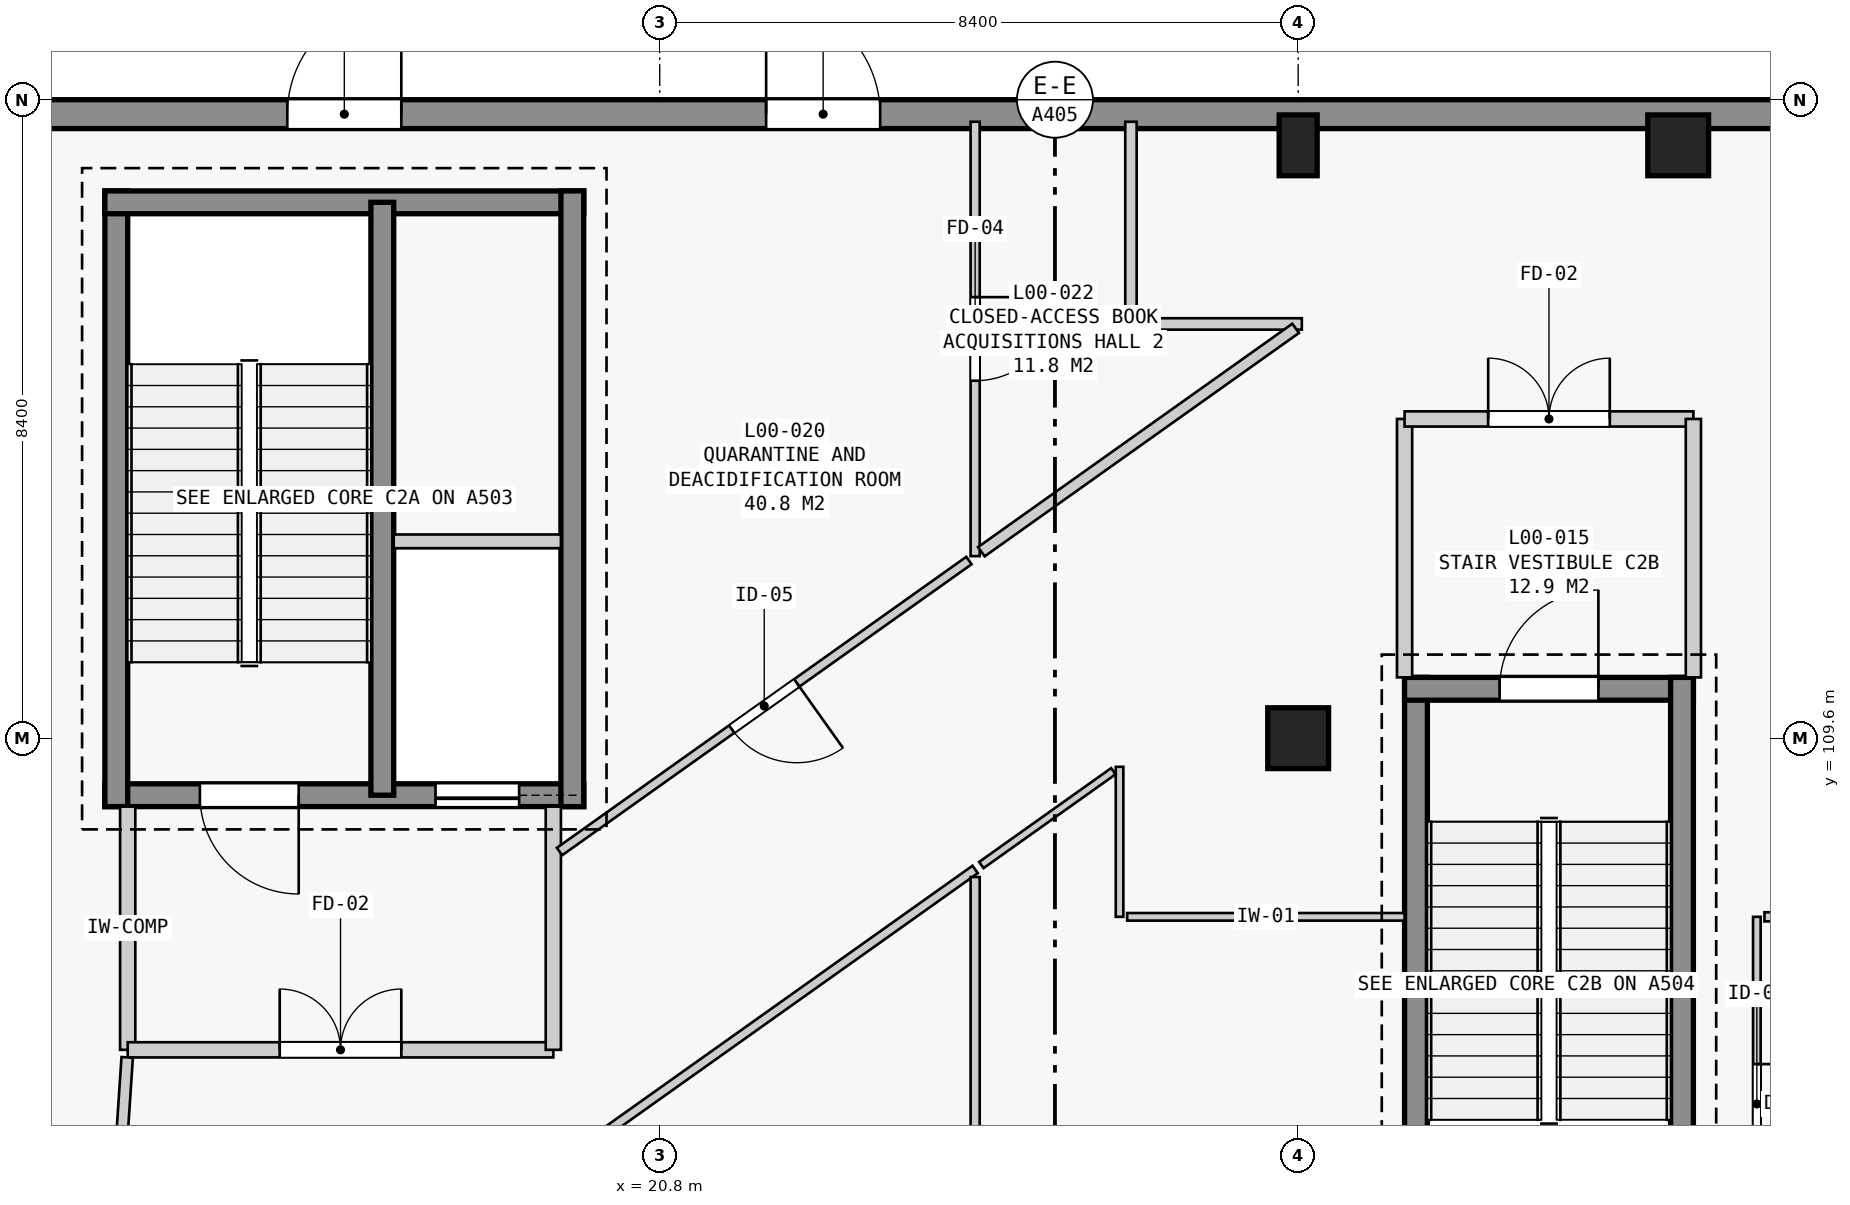
"""IFC4 building model, lengths in metres.
Left out: names, types, materials, properties, quantities, classifications, styles, units other than length and angle.
Written with IfcOpenShell. Run it as: python <this file> out.ifc"""

import sys

from ifc_helpers import new_model, si_unit, direction, frame, frame_2d, origin, origin_2d, place, context, subcontext, project, spatial, rectangle, extrude, element, fill, save


model = new_model("IFC4")
c1 = context("Model", 3, precision=1e-05, world=origin(), true_north=direction((0.0, 1.0)))
c2 = subcontext(c1, "Body", "Model", "MODEL_VIEW")
j1 = project(units=[si_unit("LENGTHUNIT", "METRE"), si_unit("PLANEANGLEUNIT", "RADIAN")], contexts=[c1])
p1 = place(None, origin())
s1 = spatial("IfcSite", under=j1, at=p1, CompositionType="ELEMENT")
p2 = place(p1, origin())
s2 = spatial("IfcBuilding", under=s1, at=p2, CompositionType="ELEMENT")
p3 = place(p2, origin())
s3 = spatial("IfcBuildingStorey", under=s2, at=p3, CompositionType="ELEMENT", Elevation=0.0)
p4 = place(p3, frame((29.2, 109.6, 0.0), z_axis=(0.0, 0.0, 1.0), x_axis=(1.0, 0.0, 0.0)))
e1 = element("IfcColumn", 1, at=p4, inside=s3, PredefinedType="COLUMN", context=c2, shape_type="SweptSolid", body=[
    extrude(rectangle(XDim=0.8, YDim=0.8, at=origin_2d()), origin(), (0.0, 0.0, 1.0), 5.4),
])
p5 = place(p3, frame((29.2, 117.4, 0.0), z_axis=(0.0, 0.0, 1.0), x_axis=(1.0, 0.0, 0.0)))
e2 = element("IfcColumn", 2, at=p5, inside=s3, PredefinedType="COLUMN", context=c2, shape_type="SweptSolid", body=[
    extrude(rectangle(XDim=0.5, YDim=0.8, at=origin_2d()), origin(), (0.0, 0.0, 1.0), 5.4),
])
p6 = place(p3, frame((34.2, 117.4, 0.0), z_axis=(0.0, 0.0, 1.0), x_axis=(1.0, 0.0, 0.0)))
e3 = element("IfcColumn", 3, at=p6, inside=s3, PredefinedType="COLUMN", context=c2, shape_type="SweptSolid", body=[
    extrude(rectangle(XDim=0.8, YDim=0.8, at=origin_2d()), origin(), (0.0, 0.0, 1.0), 5.4),
])
p7 = place(p3, frame((4.19, 117.81, 0.0), z_axis=(0.0, 0.0, 1.0), x_axis=(1.0, 0.0, 0.0)))
e4 = element("IfcWall", 4, at=p7, inside=s3, PredefinedType="STANDARD", context=c2, shape_type="SweptSolid", body=[
    extrude(rectangle(XDim=41.52, YDim=0.38, at=frame_2d((20.76, 0.0))), origin(), (0.0, 0.0, 1.0), 5.08),
])
p8 = place(p7, frame((34.36, 0.0, 0.0)))
e5 = element("IfcOpeningElement", 5, at=p8, cuts=e4, PredefinedType="OPENING", context=c2, shape_type="SweptSolid", body=[
    extrude(rectangle(XDim=1.5, YDim=2.3, at=frame_2d((0.75, 1.15))), frame((0.0, 0.2, 0.0), z_axis=(0.0, -1.0, 0.0), x_axis=(1.0, 0.0, 0.0)), (0.0, 0.0, 1.0), 0.4),
])
p9 = place(p7, frame((18.01, 0.0, 0.0)))
e6 = element("IfcOpeningElement", 6, at=p9, cuts=e4, PredefinedType="OPENING", context=c2, shape_type="SweptSolid", body=[
    extrude(rectangle(XDim=1.5, YDim=2.3, at=frame_2d((0.75, 1.15))), frame((0.0, 0.2, 0.0), z_axis=(0.0, -1.0, 0.0), x_axis=(1.0, 0.0, 0.0)), (0.0, 0.0, 1.0), 0.4),
])
p10 = place(p7, frame((11.71, 0.0, 0.0)))
e7 = element("IfcOpeningElement", 7, at=p10, cuts=e4, PredefinedType="OPENING", context=c2, shape_type="SweptSolid", body=[
    extrude(rectangle(XDim=1.5, YDim=2.3, at=frame_2d((0.75, 1.15))), frame((0.0, 0.2, 0.0), z_axis=(0.0, -1.0, 0.0), x_axis=(1.0, 0.0, 0.0)), (0.0, 0.0, 1.0), 0.4),
])
p11 = place(p3, frame((19.8, 108.85, 0.0), z_axis=(0.0, 0.0, 1.0), x_axis=(-1.0, 0.0, 0.0)))
e8 = element("IfcWall", 8, at=p11, inside=s3, PredefinedType="SHEAR", context=c2, shape_type="SweptSolid", body=[
    extrude(rectangle(XDim=6.3, YDim=0.3, at=frame_2d((3.15, 0.0))), origin(), (0.0, 0.0, 1.0), 5.08),
])
p12 = place(p11, frame((3.75, 0.0, 0.0)))
e9 = element("IfcOpeningElement", 9, at=p12, cuts=e8, PredefinedType="OPENING", context=c2, shape_type="SweptSolid", body=[
    extrude(rectangle(XDim=1.3, YDim=2.2, at=frame_2d((0.65, 1.1))), frame((0.0, 0.16, 0.0), z_axis=(0.0, -1.0, 0.0), x_axis=(1.0, 0.0, 0.0)), (0.0, 0.0, 1.0), 0.32),
])
p13 = place(p11, frame((0.85, 0.0, 0.0)))
e10 = element("IfcOpeningElement", 10, at=p13, cuts=e8, PredefinedType="OPENING", context=c2, shape_type="SweptSolid", body=[
    extrude(rectangle(XDim=1.1, YDim=2.15, at=frame_2d((0.55, 1.075))), frame((0.0, 0.16, 0.0), z_axis=(0.0, -1.0, 0.0), x_axis=(1.0, 0.0, 0.0)), (0.0, 0.0, 1.0), 0.32),
])
p14 = place(p3, frame((13.65, 108.7, 0.0), z_axis=(0.0, 0.0, 1.0), x_axis=(0.0, 1.0, 0.0)))
e11 = element("IfcWall", 11, at=p14, inside=s3, PredefinedType="SHEAR", context=c2, shape_type="SweptSolid", body=[
    extrude(rectangle(XDim=8.1, YDim=0.3, at=frame_2d((4.05, 0.0))), origin(), (0.0, 0.0, 1.0), 5.08),
])
p15 = place(p3, frame((13.5, 116.65, 0.0), z_axis=(0.0, 0.0, 1.0), x_axis=(1.0, 0.0, 0.0)))
e12 = element("IfcWall", 12, at=p15, inside=s3, PredefinedType="SHEAR", context=c2, shape_type="SweptSolid", body=[
    extrude(rectangle(XDim=6.3, YDim=0.3, at=frame_2d((3.15, 0.0))), origin(), (0.0, 0.0, 1.0), 5.08),
])
p16 = place(p3, frame((19.65, 116.8, 0.0), z_axis=(0.0, 0.0, 1.0), x_axis=(0.0, -1.0, 0.0)))
e13 = element("IfcWall", 13, at=p16, inside=s3, PredefinedType="SHEAR", context=c2, shape_type="SweptSolid", body=[
    extrude(rectangle(XDim=8.1, YDim=0.3, at=frame_2d((4.05, 0.0))), origin(), (0.0, 0.0, 1.0), 5.08),
])
p17 = place(p3, frame((17.15, 108.85, 0.0), z_axis=(0.0, 0.0, 1.0), x_axis=(0.0, 1.0, 0.0)))
e14 = element("IfcWall", 14, at=p17, inside=s3, PredefinedType="SHEAR", context=c2, shape_type="SweptSolid", body=[
    extrude(rectangle(XDim=7.8, YDim=0.3, at=frame_2d((3.9, 0.0))), origin(), (0.0, 0.0, 1.0), 5.08),
])
p18 = place(p3, frame((17.3, 112.19, 0.0), z_axis=(0.0, 0.0, 1.0), x_axis=(1.0, 0.0, 0.0)))
e15 = element("IfcWall", 15, at=p18, inside=s3, PredefinedType="PARTITIONING", context=c2, shape_type="SweptSolid", body=[
    extrude(rectangle(XDim=2.2, YDim=0.18, at=frame_2d((1.1, 0.0))), origin(), (0.0, 0.0, 1.0), 5.08),
])
p19 = place(p3, frame((13.8, 108.7, 0.0), z_axis=(0.0, 0.0, 1.0), x_axis=(0.0, -1.0, 0.0)))
e16 = element("IfcWall", 16, at=p19, inside=s3, PredefinedType="STANDARD", context=c2, shape_type="SweptSolid", body=[
    extrude(rectangle(XDim=3.2, YDim=0.2, at=frame_2d((1.6, 0.0))), origin(), (0.0, 0.0, 1.0), 5.08),
])
p20 = place(p3, frame((13.8, 105.5, 0.0), z_axis=(0.0, 0.0, 1.0), x_axis=(1.0, 0.0, 0.0)))
e17 = element("IfcWall", 17, at=p20, inside=s3, PredefinedType="STANDARD", context=c2, shape_type="SweptSolid", body=[
    extrude(rectangle(XDim=5.6, YDim=0.2, at=frame_2d((2.8, 0.0))), origin(), (0.0, 0.0, 1.0), 5.08),
])
p21 = place(p20, frame((2.0, 0.0, 0.0)))
e18 = element("IfcOpeningElement", 18, at=p21, cuts=e17, PredefinedType="OPENING", context=c2, shape_type="SweptSolid", body=[
    extrude(rectangle(XDim=1.6, YDim=2.2, at=frame_2d((0.8, 1.1))), frame((0.0, 0.11, 0.0), z_axis=(0.0, -1.0, 0.0), x_axis=(1.0, 0.0, 0.0)), (0.0, 0.0, 1.0), 0.22),
])
p22 = place(p3, frame((19.4, 105.5, 0.0), z_axis=(0.0, 0.0, 1.0), x_axis=(0.0, 1.0, 0.0)))
e19 = element("IfcWall", 19, at=p22, inside=s3, PredefinedType="STANDARD", context=c2, shape_type="SweptSolid", body=[
    extrude(rectangle(XDim=3.2, YDim=0.2, at=frame_2d((1.6, 0.0))), origin(), (0.0, 0.0, 1.0), 5.08),
])
p23 = place(p3, frame((30.75, 102.3, 0.0), z_axis=(0.0, 0.0, 1.0), x_axis=(0.0, 1.0, 0.0)))
e20 = element("IfcWall", 20, at=p23, inside=s3, PredefinedType="SHEAR", context=c2, shape_type="SweptSolid", body=[
    extrude(rectangle(XDim=8.1, YDim=0.3, at=frame_2d((4.05, 0.0))), origin(), (0.0, 0.0, 1.0), 5.08),
])
p24 = place(p3, frame((30.6, 110.25, 0.0), z_axis=(0.0, 0.0, 1.0), x_axis=(1.0, 0.0, 0.0)))
e21 = element("IfcWall", 21, at=p24, inside=s3, PredefinedType="SHEAR", context=c2, shape_type="SweptSolid", body=[
    extrude(rectangle(XDim=3.8, YDim=0.3, at=frame_2d((1.9, 0.0))), origin(), (0.0, 0.0, 1.0), 5.08),
])
p25 = place(p24, frame((1.25, 0.0, 0.0)))
e22 = element("IfcOpeningElement", 22, at=p25, cuts=e21, PredefinedType="OPENING", context=c2, shape_type="SweptSolid", body=[
    extrude(rectangle(XDim=1.3, YDim=2.2, at=frame_2d((0.65, 1.1))), frame((0.0, 0.16, 0.0), z_axis=(0.0, -1.0, 0.0), x_axis=(1.0, 0.0, 0.0)), (0.0, 0.0, 1.0), 0.32),
])
p26 = place(p3, frame((34.25, 110.4, 0.0), z_axis=(0.0, 0.0, 1.0), x_axis=(0.0, -1.0, 0.0)))
e23 = element("IfcWall", 23, at=p26, inside=s3, PredefinedType="SHEAR", context=c2, shape_type="SweptSolid", body=[
    extrude(rectangle(XDim=8.1, YDim=0.3, at=frame_2d((4.05, 0.0))), origin(), (0.0, 0.0, 1.0), 5.08),
])
p27 = place(p3, frame((30.6, 110.4, 0.0), z_axis=(0.0, 0.0, 1.0), x_axis=(0.0, 1.0, 0.0)))
e24 = element("IfcWall", 24, at=p27, inside=s3, PredefinedType="STANDARD", context=c2, shape_type="SweptSolid", body=[
    extrude(rectangle(XDim=3.4, YDim=0.2, at=frame_2d((1.7, 0.0))), origin(), (0.0, 0.0, 1.0), 5.08),
])
p28 = place(p3, frame((30.6, 113.8, 0.0), z_axis=(0.0, 0.0, 1.0), x_axis=(1.0, 0.0, 0.0)))
e25 = element("IfcWall", 25, at=p28, inside=s3, PredefinedType="STANDARD", context=c2, shape_type="SweptSolid", body=[
    extrude(rectangle(XDim=3.8, YDim=0.2, at=frame_2d((1.9, 0.0))), origin(), (0.0, 0.0, 1.0), 5.08),
])
p29 = place(p28, frame((1.1, 0.0, 0.0)))
e26 = element("IfcOpeningElement", 26, at=p29, cuts=e25, PredefinedType="OPENING", context=c2, shape_type="SweptSolid", body=[
    extrude(rectangle(XDim=1.6, YDim=2.2, at=frame_2d((0.8, 1.1))), frame((0.0, 0.11, 0.0), z_axis=(0.0, -1.0, 0.0), x_axis=(1.0, 0.0, 0.0)), (0.0, 0.0, 1.0), 0.22),
])
p30 = place(p3, frame((34.4, 113.8, 0.0), z_axis=(0.0, 0.0, 1.0), x_axis=(0.0, -1.0, 0.0)))
e27 = element("IfcWall", 27, at=p30, inside=s3, PredefinedType="STANDARD", context=c2, shape_type="SweptSolid", body=[
    extrude(rectangle(XDim=3.4, YDim=0.2, at=frame_2d((1.7, 0.0))), origin(), (0.0, 0.0, 1.0), 5.08),
])
p31 = place(p3, frame((13.793, 105.4, 0.0), z_axis=(0.0, 0.0, 1.0), x_axis=(-0.066440960793, -0.997790358106, 0.0)))
e28 = element("IfcWall", 28, at=p31, inside=s3, PredefinedType="PARTITIONING", context=c2, shape_type="SweptSolid", body=[
    extrude(rectangle(XDim=2.906, YDim=0.15, at=frame_2d((1.453, 0.0))), origin(), (0.0, 0.0, 1.0), 5.08),
])
p32 = place(p3, frame((19.681, 104.129, 0.0), z_axis=(0.0, 0.0, 1.0), x_axis=(0.815111881722, 0.579303564874, 0.0)))
e29 = element("IfcWall", 29, at=p32, inside=s3, PredefinedType="PARTITIONING", context=c2, shape_type="SweptSolid", body=[
    extrude(rectangle(XDim=6.464, YDim=0.12, at=frame_2d((3.232, 0.0))), origin(), (0.0, 0.0, 1.0), 5.08),
])
p33 = place(p3, frame((24.95, 107.773, 0.0), z_axis=(0.0, 0.0, 1.0), x_axis=(0.0, -1.0, 0.0)))
e30 = element("IfcWall", 30, at=p33, inside=s3, PredefinedType="PARTITIONING", context=c2, shape_type="SweptSolid", body=[
    extrude(rectangle(XDim=31.383, YDim=0.12, at=frame_2d((15.692, 0.0))), origin(), (0.0, 0.0, 1.0), 3.56),
])
p34 = place(p33, frame((15.167, 0.0, 0.0)))
e31 = element("IfcOpeningElement", 31, at=p34, cuts=e30, PredefinedType="OPENING", context=c2, shape_type="SweptSolid", body=[
    extrude(rectangle(XDim=1.05, YDim=2.15, at=frame_2d((0.525, 1.075))), frame((0.0, 0.07, 0.0), z_axis=(0.0, -1.0, 0.0), x_axis=(1.0, 0.0, 0.0)), (0.0, 0.0, 1.0), 0.14),
])
p35 = place(p33, frame((13.842, 0.0, 0.0)))
e32 = element("IfcOpeningElement", 32, at=p35, cuts=e30, PredefinedType="OPENING", context=c2, shape_type="SweptSolid", body=[
    extrude(rectangle(XDim=1.0, YDim=2.15, at=frame_2d((0.5, 1.075))), frame((0.0, 0.07, 0.0), z_axis=(0.0, -1.0, 0.0), x_axis=(1.0, 0.0, 0.0)), (0.0, 0.0, 1.0), 0.14),
])
p36 = place(p3, frame((24.95, 117.71, 0.0), z_axis=(0.0, 0.0, 1.0), x_axis=(0.0, -1.0, 0.0)))
e33 = element("IfcWall", 33, at=p36, inside=s3, PredefinedType="PARTITIONING", context=c2, shape_type="SweptSolid", body=[
    extrude(rectangle(XDim=5.715, YDim=0.12, at=frame_2d((2.857, 0.0))), origin(), (0.0, 0.0, 1.0), 5.08),
])
p37 = place(p36, frame((2.307, 0.0, 0.0)))
e34 = element("IfcOpeningElement", 34, at=p37, cuts=e33, PredefinedType="OPENING", context=c2, shape_type="SweptSolid", body=[
    extrude(rectangle(XDim=1.1, YDim=2.15, at=frame_2d((0.55, 1.075))), frame((0.0, 0.07, 0.0), z_axis=(0.0, -1.0, 0.0), x_axis=(1.0, 0.0, 0.0)), (0.0, 0.0, 1.0), 0.14),
])
p38 = place(p3, frame((24.868, 111.938, 0.0), z_axis=(0.0, 0.0, 1.0), x_axis=(-0.815106502329, -0.579311133901, 0.0)))
e35 = element("IfcWall", 35, at=p38, inside=s3, PredefinedType="PARTITIONING", context=c2, shape_type="SweptSolid", body=[
    extrude(rectangle(XDim=6.609, YDim=0.12, at=frame_2d((3.304, 0.0))), origin(), (0.0, 0.0, 1.0), 5.08),
])
p39 = place(p38, frame((2.779, 0.0, 0.0)))
e36 = element("IfcOpeningElement", 36, at=p39, cuts=e35, PredefinedType="OPENING", context=c2, shape_type="SweptSolid", body=[
    extrude(rectangle(XDim=1.05, YDim=2.15, at=frame_2d((0.525, 1.075))), frame((0.0, 0.07, 0.0), z_axis=(0.0, -1.0, 0.0), x_axis=(1.0, 0.0, 0.0)), (0.0, 0.0, 1.0), 0.14),
])
p40 = place(p3, frame((26.85, 109.223, 0.0), z_axis=(0.0, 0.0, 1.0), x_axis=(0.0, -1.0, 0.0)))
e37 = element("IfcWall", 37, at=p40, inside=s3, PredefinedType="PARTITIONING", context=c2, shape_type="SweptSolid", body=[
    extrude(rectangle(XDim=1.973, YDim=0.1, at=frame_2d((0.987, 0.0))), origin(), (0.0, 0.0, 1.0), 5.08),
])
p41 = place(p3, frame((26.95, 107.25, 0.0), z_axis=(0.0, 0.0, 1.0), x_axis=(1.0, 0.0, 0.0)))
e38 = element("IfcWall", 38, at=p41, inside=s3, PredefinedType="PARTITIONING", context=c2, shape_type="SweptSolid", body=[
    extrude(rectangle(XDim=3.65, YDim=0.1, at=frame_2d((1.825, 0.0))), origin(), (0.0, 0.0, 1.0), 4.16),
])
p42 = place(p3, frame((35.235, 107.25, 0.0), z_axis=(0.0, 0.0, 1.0), x_axis=(0.0, -1.0, 0.0)))
e39 = element("IfcWall", 39, at=p42, inside=s3, PredefinedType="PARTITIONING", context=c2, shape_type="SweptSolid", body=[
    extrude(rectangle(XDim=4.925, YDim=0.1, at=frame_2d((2.462, 0.0))), origin(), (0.0, 0.0, 1.0), 5.08),
])
p43 = place(p42, frame((1.938, 0.0, 0.0)))
e40 = element("IfcOpeningElement", 40, at=p43, cuts=e39, PredefinedType="OPENING", context=c2, shape_type="SweptSolid", body=[
    extrude(rectangle(XDim=1.05, YDim=2.15, at=frame_2d((0.525, 1.075))), frame((0.0, 0.06, 0.0), z_axis=(0.0, -1.0, 0.0), x_axis=(1.0, 0.0, 0.0)), (0.0, 0.0, 1.0), 0.12),
])
p44 = place(p3, frame((25.031, 107.931, 0.0), z_axis=(0.0, 0.0, 1.0), x_axis=(0.815147665864, 0.57925321133, 0.0)))
e41 = element("IfcWall", 41, at=p44, inside=s3, PredefinedType="PARTITIONING", context=c2, shape_type="SweptSolid", body=[
    extrude(rectangle(XDim=2.131, YDim=0.1, at=frame_2d((1.065, 0.0))), origin(), (0.0, 0.0, 1.0), 5.08),
])
p45 = place(p3, frame((27.0, 115.05, 0.0), z_axis=(0.0, 0.0, 1.0), x_axis=(1.0, 0.0, 0.0)))
e42 = element("IfcWall", 42, at=p45, inside=s3, PredefinedType="PARTITIONING", context=c2, shape_type="SweptSolid", body=[
    extrude(rectangle(XDim=2.248, YDim=0.15, at=frame_2d((1.124, 0.0))), origin(), (0.0, 0.0, 1.0), 4.36),
])
p46 = place(p3, frame((29.167, 114.992, 0.0), z_axis=(0.0, 0.0, 1.0), x_axis=(-0.815109845226, -0.579306430324, 0.0)))
e43 = element("IfcWall", 43, at=p46, inside=s3, PredefinedType="PARTITIONING", context=c2, shape_type="SweptSolid", body=[
    extrude(rectangle(XDim=5.073, YDim=0.15, at=frame_2d((2.537, 0.0))), origin(), (0.0, 0.0, 1.0), 4.36),
])
p47 = place(p3, frame((27.0, 117.71, 0.0), z_axis=(0.0, 0.0, 1.0), x_axis=(0.0, -1.0, 0.0)))
e44 = element("IfcWall", 44, at=p47, inside=s3, PredefinedType="PARTITIONING", context=c2, shape_type="SweptSolid", body=[
    extrude(rectangle(XDim=2.56, YDim=0.15, at=frame_2d((1.28, 0.0))), origin(), (0.0, 0.0, 1.0), 5.08),
])
p48 = place(p3, frame((35.335, 107.25, 0.0), z_axis=(0.0, 0.0, 1.0), x_axis=(1.0, 0.0, 0.0)))
e45 = element("IfcWall", 45, at=p48, inside=s3, PredefinedType="PARTITIONING", context=c2, shape_type="SweptSolid", body=[
    extrude(rectangle(XDim=2.905, YDim=0.12, at=frame_2d((1.453, 0.0))), origin(), (0.0, 0.0, 1.0), 4.36),
])
p49 = place(p9, origin())
e46 = element("IfcDoor", 46, at=p49, inside=s3, OperationType="SINGLE_SWING_LEFT", PredefinedType="DOOR", context=c2, shape_type="SweptSolid", body=[
    extrude(rectangle(XDim=1.5, YDim=2.3, at=frame_2d((0.75, 1.15))), frame((0.0, 0.025, 0.0), z_axis=(0.0, -1.0, 0.0), x_axis=(1.0, 0.0, 0.0)), (0.0, 0.0, 1.0), 0.05),
])
fill(e6, e46)
p50 = place(p10, origin())
e47 = element("IfcDoor", 47, at=p50, inside=s3, OperationType="SINGLE_SWING_RIGHT", PredefinedType="DOOR", context=c2, shape_type="SweptSolid", body=[
    extrude(rectangle(XDim=1.5, YDim=2.3, at=frame_2d((0.75, 1.15))), frame((0.0, 0.025, 0.0), z_axis=(0.0, -1.0, 0.0), x_axis=(1.0, 0.0, 0.0)), (0.0, 0.0, 1.0), 0.05),
])
fill(e7, e47)
p51 = place(p12, origin())
e48 = element("IfcDoor", 48, at=p51, inside=s3, OperationType="SINGLE_SWING_LEFT", PredefinedType="DOOR", context=c2, shape_type="SweptSolid", body=[
    extrude(rectangle(XDim=1.3, YDim=2.2, at=frame_2d((0.65, 1.1))), frame((0.0, 0.025, 0.0), z_axis=(0.0, -1.0, 0.0), x_axis=(1.0, 0.0, 0.0)), (0.0, 0.0, 1.0), 0.05),
])
fill(e9, e48)
p52 = place(p13, origin())
e49 = element("IfcDoor", 49, at=p52, inside=s3, OperationType="SLIDING_TO_LEFT", PredefinedType="DOOR", context=c2, shape_type="SweptSolid", body=[
    extrude(rectangle(XDim=1.1, YDim=2.15, at=frame_2d((0.55, 1.075))), frame((0.0, 0.025, 0.0), z_axis=(0.0, -1.0, 0.0), x_axis=(1.0, 0.0, 0.0)), (0.0, 0.0, 1.0), 0.05),
])
fill(e10, e49)
p53 = place(p25, origin())
e50 = element("IfcDoor", 50, at=p53, inside=s3, OperationType="SINGLE_SWING_RIGHT", PredefinedType="DOOR", context=c2, shape_type="SweptSolid", body=[
    extrude(rectangle(XDim=1.3, YDim=2.2, at=frame_2d((0.65, 1.1))), frame((0.0, 0.025, 0.0), z_axis=(0.0, -1.0, 0.0), x_axis=(1.0, 0.0, 0.0)), (0.0, 0.0, 1.0), 0.05),
])
fill(e22, e50)
p54 = place(p21, origin())
e51 = element("IfcDoor", 51, at=p54, inside=s3, OperationType="DOUBLE_DOOR_SINGLE_SWING", PredefinedType="DOOR", context=c2, shape_type="SweptSolid", body=[
    extrude(rectangle(XDim=1.6, YDim=2.2, at=frame_2d((0.8, 1.1))), frame((0.0, 0.025, 0.0), z_axis=(0.0, -1.0, 0.0), x_axis=(1.0, 0.0, 0.0)), (0.0, 0.0, 1.0), 0.05),
])
fill(e18, e51)
p55 = place(p29, origin())
e52 = element("IfcDoor", 52, at=p55, inside=s3, OperationType="DOUBLE_DOOR_SINGLE_SWING", PredefinedType="DOOR", context=c2, shape_type="SweptSolid", body=[
    extrude(rectangle(XDim=1.6, YDim=2.2, at=frame_2d((0.8, 1.1))), frame((0.0, 0.025, 0.0), z_axis=(0.0, -1.0, 0.0), x_axis=(1.0, 0.0, 0.0)), (0.0, 0.0, 1.0), 0.05),
])
fill(e26, e52)
p56 = place(p39, origin())
e53 = element("IfcDoor", 53, at=p56, inside=s3, OperationType="SINGLE_SWING_LEFT", PredefinedType="DOOR", context=c2, shape_type="SweptSolid", body=[
    extrude(rectangle(XDim=1.05, YDim=2.15, at=frame_2d((0.525, 1.075))), frame((0.0, 0.025, 0.0), z_axis=(0.0, -1.0, 0.0), x_axis=(1.0, 0.0, 0.0)), (0.0, 0.0, 1.0), 0.05),
])
fill(e36, e53)
p57 = place(p37, origin())
e54 = element("IfcDoor", 54, at=p57, inside=s3, OperationType="SINGLE_SWING_LEFT", PredefinedType="DOOR", context=c2, shape_type="SweptSolid", body=[
    extrude(rectangle(XDim=1.1, YDim=2.15, at=frame_2d((0.55, 1.075))), frame((0.0, 0.025, 0.0), z_axis=(0.0, -1.0, 0.0), x_axis=(1.0, 0.0, 0.0)), (0.0, 0.0, 1.0), 0.05),
])
fill(e34, e54)
p58 = place(p43, origin())
e55 = element("IfcDoor", 55, at=p58, inside=s3, OperationType="SINGLE_SWING_LEFT", PredefinedType="DOOR", context=c2, shape_type="SweptSolid", body=[
    extrude(rectangle(XDim=1.05, YDim=2.15, at=frame_2d((0.525, 1.075))), frame((0.0, 0.025, 0.0), z_axis=(0.0, -1.0, 0.0), x_axis=(1.0, 0.0, 0.0)), (0.0, 0.0, 1.0), 0.05),
])
fill(e40, e55)
save(model, sys.argv[1])
